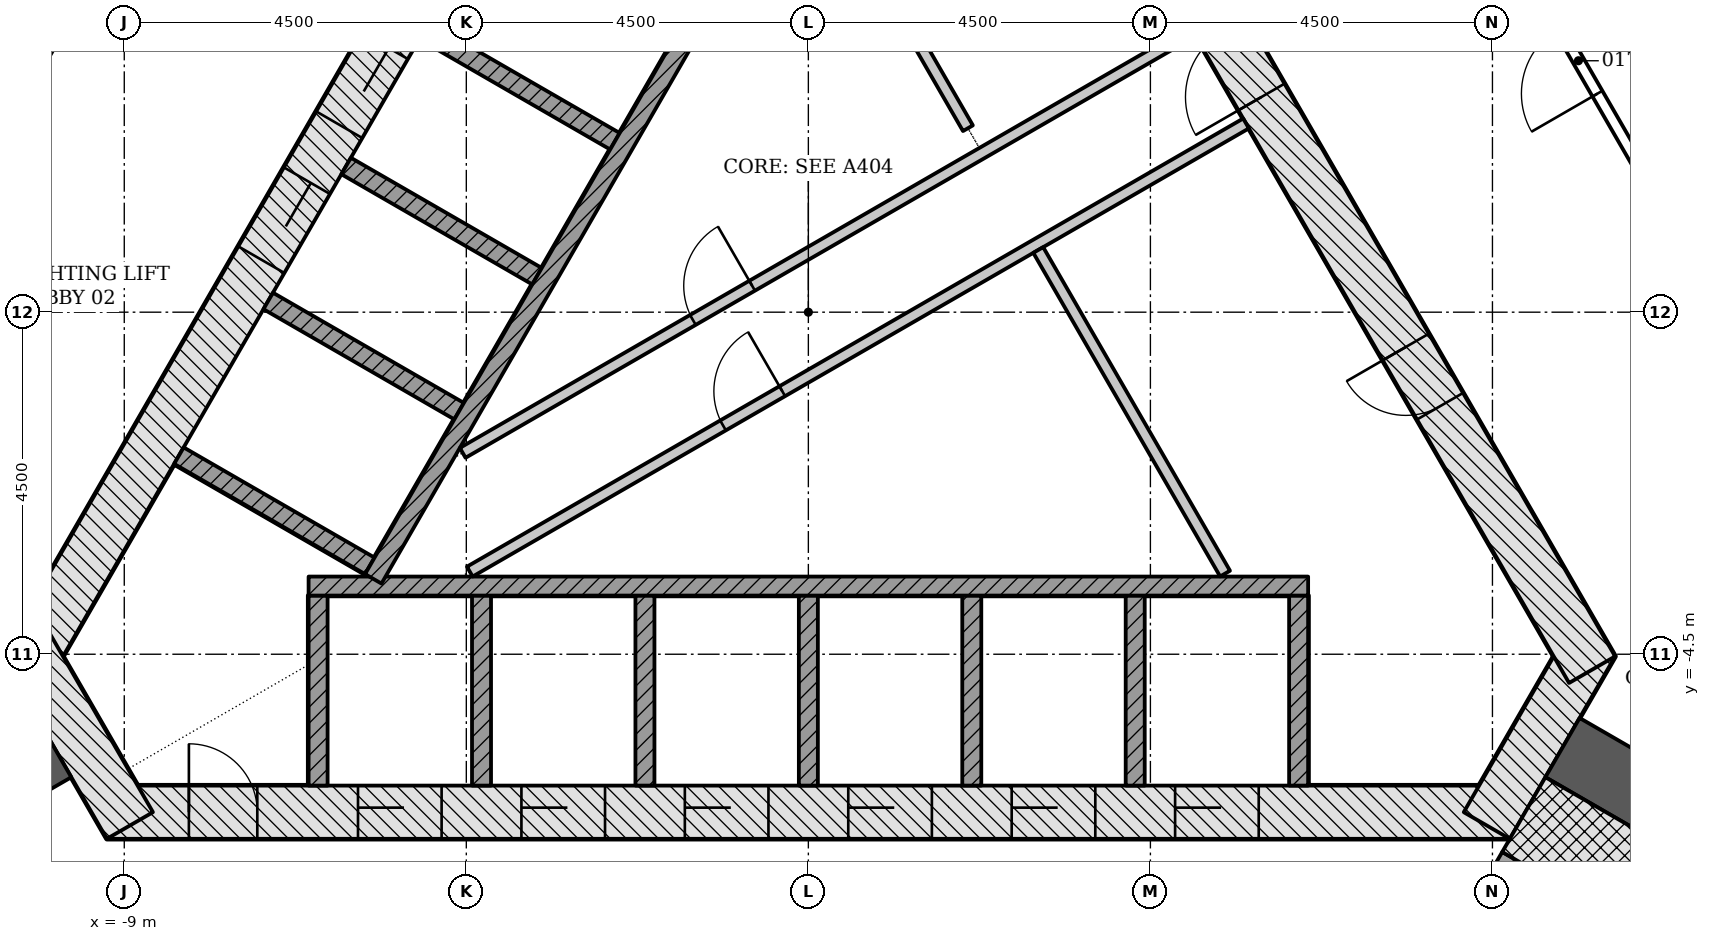
"""IFC4 building model, lengths in metres.
Left out: names, types, materials, properties, quantities, classifications, styles, units other than length and angle.
Written with IfcOpenShell. Run it as: python <this file> out.ifc"""

import sys

from ifc_helpers import new_model, si_unit, direction, frame, frame_2d, origin, place, context, subcontext, project, spatial, rectangle, extrude, element, fill, save


model = new_model("IFC4")
c1 = context("Model", 3, precision=1e-05, world=origin(), true_north=direction((0.0, 1.0)))
c2 = subcontext(c1, "Body", "Model", "MODEL_VIEW")
j1 = project(units=[si_unit("LENGTHUNIT", "METRE"), si_unit("PLANEANGLEUNIT", "RADIAN")], contexts=[c1])
p1 = place(None, origin())
s1 = spatial("IfcSite", under=j1, at=p1, CompositionType="ELEMENT")
p2 = place(p1, origin())
s2 = spatial("IfcBuilding", under=s1, at=p2, CompositionType="ELEMENT")
p3 = place(p2, frame((0.0, 0.0, 10.5)))
s3 = spatial("IfcBuildingStorey", under=s2, at=p3, CompositionType="ELEMENT", Elevation=10.5)
p4 = place(p3, frame((-9.229, -6.578, -0.25), z_axis=(0.0, 0.0, 1.0), x_axis=(1.0, 0.0, 0.0)))
e1 = element("IfcWall", 1, at=p4, inside=s3, PredefinedType="SHEAR", context=c2, shape_type="SweptSolid", body=[
    extrude(rectangle(XDim=18.458, YDim=0.7, at=frame_2d((9.229, 0.0))), origin(), (0.0, 0.0, 1.0), 4.5),
])
p5 = place(p4, frame((3.304, 0.0, 0.25)))
e2 = element("IfcOpeningElement", 2, at=p5, cuts=e1, PredefinedType="OPENING", context=c2, shape_type="SweptSolid", body=[
    extrude(rectangle(XDim=1.1, YDim=2.1, at=frame_2d((0.55, 1.05))), frame((0.0, 0.36, 0.0), z_axis=(0.0, -1.0, 0.0), x_axis=(1.0, 0.0, 0.0)), (0.0, 0.0, 1.0), 0.72),
])
p6 = place(p4, frame((5.454, 0.0, 0.25)))
e3 = element("IfcOpeningElement", 3, at=p6, cuts=e1, PredefinedType="OPENING", context=c2, shape_type="SweptSolid", body=[
    extrude(rectangle(XDim=1.1, YDim=2.1, at=frame_2d((0.55, 1.05))), frame((0.0, 0.36, 0.0), z_axis=(0.0, -1.0, 0.0), x_axis=(1.0, 0.0, 0.0)), (0.0, 0.0, 1.0), 0.72),
])
p7 = place(p4, frame((7.604, 0.0, 0.25)))
e4 = element("IfcOpeningElement", 4, at=p7, cuts=e1, PredefinedType="OPENING", context=c2, shape_type="SweptSolid", body=[
    extrude(rectangle(XDim=1.1, YDim=2.1, at=frame_2d((0.55, 1.05))), frame((0.0, 0.36, 0.0), z_axis=(0.0, -1.0, 0.0), x_axis=(1.0, 0.0, 0.0)), (0.0, 0.0, 1.0), 0.72),
])
p8 = place(p4, frame((9.754, 0.0, 0.25)))
e5 = element("IfcOpeningElement", 5, at=p8, cuts=e1, PredefinedType="OPENING", context=c2, shape_type="SweptSolid", body=[
    extrude(rectangle(XDim=1.1, YDim=2.1, at=frame_2d((0.55, 1.05))), frame((0.0, 0.36, 0.0), z_axis=(0.0, -1.0, 0.0), x_axis=(1.0, 0.0, 0.0)), (0.0, 0.0, 1.0), 0.72),
])
p9 = place(p4, frame((11.904, 0.0, 0.25)))
e6 = element("IfcOpeningElement", 6, at=p9, cuts=e1, PredefinedType="OPENING", context=c2, shape_type="SweptSolid", body=[
    extrude(rectangle(XDim=1.1, YDim=2.1, at=frame_2d((0.55, 1.05))), frame((0.0, 0.36, 0.0), z_axis=(0.0, -1.0, 0.0), x_axis=(1.0, 0.0, 0.0)), (0.0, 0.0, 1.0), 0.72),
])
p10 = place(p4, frame((14.054, 0.0, 0.25)))
e7 = element("IfcOpeningElement", 7, at=p10, cuts=e1, PredefinedType="OPENING", context=c2, shape_type="SweptSolid", body=[
    extrude(rectangle(XDim=1.1, YDim=2.1, at=frame_2d((0.55, 1.05))), frame((0.0, 0.36, 0.0), z_axis=(0.0, -1.0, 0.0), x_axis=(1.0, 0.0, 0.0)), (0.0, 0.0, 1.0), 0.72),
])
p11 = place(p4, frame((1.079, 0.0, 0.25)))
e8 = element("IfcOpeningElement", 8, at=p11, cuts=e1, PredefinedType="OPENING", context=c2, shape_type="SweptSolid", body=[
    extrude(rectangle(XDim=0.9, YDim=2.1, at=frame_2d((0.45, 1.05))), frame((0.0, 0.36, 0.0), z_axis=(0.0, -1.0, 0.0), x_axis=(1.0, 0.0, 0.0)), (0.0, 0.0, 1.0), 0.72),
])
p12 = place(p3, frame((8.926, -6.753, -0.25), z_axis=(0.0, 0.0, 1.0), x_axis=(0.500042739161, 0.866000726912, 0.0)))
e9 = element("IfcWall", 9, at=p12, inside=s3, PredefinedType="SHEAR", context=c2, shape_type="SweptSolid", body=[
    extrude(rectangle(XDim=2.771, YDim=0.7, at=frame_2d((1.386, 0.0))), origin(), (0.0, 0.0, 1.0), 4.5),
])
p13 = place(p3, frame((10.311, -4.703, -0.25), z_axis=(0.0, 0.0, 1.0), x_axis=(-0.500001446645, 0.866024568562, 0.0)))
e10 = element("IfcWall", 10, at=p13, inside=s3, PredefinedType="SHEAR", context=c2, shape_type="SweptSolid", body=[
    extrude(rectangle(XDim=18.458, YDim=0.7, at=frame_2d((9.229, 0.0))), origin(), (0.0, 0.0, 1.0), 4.5),
])
p14 = place(p13, frame((8.7, 0.0, 0.25)))
e11 = element("IfcOpeningElement", 11, at=p14, cuts=e10, PredefinedType="OPENING", context=c2, shape_type="SweptSolid", body=[
    extrude(rectangle(XDim=1.0, YDim=2.1, at=frame_2d((0.5, 1.05))), frame((0.0, 0.36, 0.0), z_axis=(0.0, -1.0, 0.0), x_axis=(1.0, 0.0, 0.0)), (0.0, 0.0, 1.0), 0.72),
])
p15 = place(p13, frame((4.002, 0.0, 0.25)))
e12 = element("IfcOpeningElement", 12, at=p15, cuts=e10, PredefinedType="OPENING", context=c2, shape_type="SweptSolid", body=[
    extrude(rectangle(XDim=0.9, YDim=2.1, at=frame_2d((0.45, 1.05))), frame((0.0, 0.36, 0.0), z_axis=(0.0, -1.0, 0.0), x_axis=(1.0, 0.0, 0.0)), (0.0, 0.0, 1.0), 0.72),
])
p16 = place(p13, frame((14.093, 0.0, 0.25)))
e13 = element("IfcOpeningElement", 13, at=p16, cuts=e10, PredefinedType="OPENING", context=c2, shape_type="SweptSolid", body=[
    extrude(rectangle(XDim=0.9, YDim=2.1, at=frame_2d((0.45, 1.05))), frame((0.0, 0.36, 0.0), z_axis=(0.0, -1.0, 0.0), x_axis=(1.0, 0.0, 0.0)), (0.0, 0.0, 1.0), 0.72),
])
p17 = place(p3, frame((-1.083, 11.281, -0.25), z_axis=(0.0, 0.0, 1.0), x_axis=(-0.500001446645, -0.866024568562, 0.0)))
e14 = element("IfcWall", 14, at=p17, inside=s3, PredefinedType="SHEAR", context=c2, shape_type="SweptSolid", body=[
    extrude(rectangle(XDim=18.458, YDim=0.7, at=frame_2d((9.229, 0.0))), origin(), (0.0, 0.0, 1.0), 4.5),
])
p18 = place(p17, frame((8.979, 0.0, 0.25)))
e15 = element("IfcOpeningElement", 15, at=p18, cuts=e14, PredefinedType="OPENING", context=c2, shape_type="SweptSolid", body=[
    extrude(rectangle(XDim=1.2, YDim=2.1, at=frame_2d((0.6, 1.05))), frame((0.0, 0.36, 0.0), z_axis=(0.0, -1.0, 0.0), x_axis=(1.0, 0.0, 0.0)), (0.0, 0.0, 1.0), 0.72),
])
p19 = place(p17, frame((11.029, 0.0, 0.25)))
e16 = element("IfcOpeningElement", 16, at=p19, cuts=e14, PredefinedType="OPENING", context=c2, shape_type="SweptSolid", body=[
    extrude(rectangle(XDim=1.2, YDim=2.1, at=frame_2d((0.6, 1.05))), frame((0.0, 0.36, 0.0), z_axis=(0.0, -1.0, 0.0), x_axis=(1.0, 0.0, 0.0)), (0.0, 0.0, 1.0), 0.72),
])
p20 = place(p3, frame((-10.311, -4.353, -0.25), z_axis=(0.0, 0.0, 1.0), x_axis=(0.500042739161, -0.866000726912, 0.0)))
e17 = element("IfcWall", 17, at=p20, inside=s3, PredefinedType="SHEAR", context=c2, shape_type="SweptSolid", body=[
    extrude(rectangle(XDim=2.771, YDim=0.7, at=frame_2d((1.386, 0.0))), origin(), (0.0, 0.0, 1.0), 4.5),
])
p21 = place(p3, frame((-9.922, -5.728, -0.25), z_axis=(0.0, 0.0, 1.0), x_axis=(-0.866028046028, -0.499995423472, 0.0)))
e18 = element("IfcWall", 18, at=p21, inside=s3, PredefinedType="SHEAR", context=c2, shape_type="SweptSolid", body=[
    extrude(rectangle(XDim=14.633, YDim=0.9, at=frame_2d((7.316, 0.0))), origin(), (0.0, 0.0, 1.0), 4.5),
])
p22 = place(p21, frame((7.35, 0.0, 0.25)))
e19 = element("IfcOpeningElement", 19, at=p22, cuts=e18, PredefinedType="OPENING", context=c2, shape_type="SweptSolid", body=[
    extrude(rectangle(XDim=1.5, YDim=2.1, at=frame_2d((0.75, 1.05))), frame((0.0, 0.46, 0.0), z_axis=(0.0, -1.0, 0.0), x_axis=(1.0, 0.0, 0.0)), (0.0, 0.0, 1.0), 0.92),
])
p23 = place(p3, frame((9.922, -5.728, -0.25), z_axis=(0.0, 0.0, 1.0), x_axis=(0.866028046028, -0.499995423472, 0.0)))
e20 = element("IfcWall", 20, at=p23, inside=s3, PredefinedType="SHEAR", context=c2, shape_type="SweptSolid", body=[
    extrude(rectangle(XDim=14.633, YDim=0.9, at=frame_2d((7.316, 0.0))), origin(), (0.0, 0.0, 1.0), 4.5),
])
p24 = place(p23, frame((7.35, 0.0, 0.25)))
e21 = element("IfcOpeningElement", 21, at=p24, cuts=e20, PredefinedType="OPENING", context=c2, shape_type="SweptSolid", body=[
    extrude(rectangle(XDim=1.5, YDim=2.1, at=frame_2d((0.75, 1.05))), frame((0.0, 0.46, 0.0), z_axis=(0.0, -1.0, 0.0), x_axis=(1.0, 0.0, 0.0)), (0.0, 0.0, 1.0), 0.92),
])
for number, where, z_axis, x_axis in (
    (22, (-6.45, -6.228, -0.25), (0.0, 0.0, 1.0), (0.0, 1.0, 0.0)),
    (23, (-4.3, -6.228, -0.25), (0.0, 0.0, 1.0), (0.0, 1.0, 0.0)),
    (24, (-2.15, -6.228, -0.25), (0.0, 0.0, 1.0), (0.0, 1.0, 0.0)),
    (25, (0.0, -6.228, -0.25), (0.0, 0.0, 1.0), (0.0, 1.0, 0.0)),
    (26, (2.15, -6.228, -0.25), (0.0, 0.0, 1.0), (0.0, 1.0, 0.0)),
    (27, (4.3, -6.228, -0.25), (0.0, 0.0, 1.0), (0.0, 1.0, 0.0)),
    (28, (6.45, -6.228, -0.25), (0.0, 0.0, 1.0), (0.0, 1.0, 0.0)),
):
    element("IfcWall", number, at=place(p3, frame(where, z_axis=z_axis, x_axis=x_axis)), inside=s3, PredefinedType="PARTITIONING", context=c2, shape_type="SweptSolid", body=[
        extrude(rectangle(XDim=2.5, YDim=0.25, at=frame_2d((1.25, 0.0))), origin(), (0.0, 0.0, 1.0), 4.5),
    ])
p25 = place(p3, frame((-6.575, -3.603, 0.0), z_axis=(0.0, 0.0, 1.0), x_axis=(1.0, 0.0, 0.0)))
e29 = element("IfcWall", 29, at=p25, inside=s3, PredefinedType="PARTITIONING", context=c2, shape_type="SweptSolid", body=[
    extrude(rectangle(XDim=13.15, YDim=0.25, at=frame_2d((6.575, 0.0))), origin(), (0.0, 0.0, 1.0), 4.25),
])
for number, where, z_axis, x_axis in (
    (30, (-5.056, 3.699, -0.25), (0.0, 0.0, 1.0), (0.866, -0.5, 0.0)),
    (31, (-6.081, 1.923, -0.25), (0.0, 0.0, 1.0), (0.866, -0.5, 0.0)),
    (32, (-7.106, 0.148, -0.25), (0.0, 0.0, 1.0), (0.866, -0.5, 0.0)),
    (33, (-8.281, -1.887, -0.25), (0.0, 0.0, 1.0), (0.866, -0.5, 0.0)),
):
    element("IfcWall", number, at=place(p3, frame(where, z_axis=z_axis, x_axis=x_axis)), inside=s3, PredefinedType="PARTITIONING", context=c2, shape_type="SweptSolid", body=[
        extrude(rectangle(XDim=2.9, YDim=0.25, at=frame_2d((1.45, 0.0))), origin(), (0.0, 0.0, 1.0), 4.5),
    ])
p26 = place(p3, frame((0.176, 6.711, 0.0), z_axis=(0.0, 0.0, 1.0), x_axis=(-0.500004227369, -0.866022963098, 0.0)))
e34 = element("IfcWall", 34, at=p26, inside=s3, PredefinedType="PARTITIONING", context=c2, shape_type="SweptSolid", body=[
    extrude(rectangle(XDim=11.8, YDim=0.25, at=frame_2d((5.9, 0.0))), origin(), (0.0, 0.0, 1.0), 4.25),
])
p27 = place(p3, frame((-4.548, -1.851, 0.0), z_axis=(0.0, 0.0, 1.0), x_axis=(0.866023939251, 0.500002536638, 0.0)))
e35 = element("IfcWall", 35, at=p27, inside=s3, PredefinedType="PARTITIONING", context=c2, shape_type="SweptSolid", body=[
    extrude(rectangle(XDim=11.092, YDim=0.15, at=frame_2d((5.546, 0.0))), origin(), (0.0, 0.0, 1.0), 4.25),
])
p28 = place(p27, frame((3.497, 0.0, 0.0)))
e36 = element("IfcOpeningElement", 36, at=p28, cuts=e35, PredefinedType="OPENING", context=c2, shape_type="SweptSolid", body=[
    extrude(rectangle(XDim=0.9, YDim=2.1, at=frame_2d((0.45, 1.05))), frame((0.0, 0.085, 0.0), z_axis=(0.0, -1.0, 0.0), x_axis=(1.0, 0.0, 0.0)), (0.0, 0.0, 1.0), 0.17),
])
p29 = place(p3, frame((2.099, 2.42, 0.0), z_axis=(0.0, 0.0, 1.0), x_axis=(-0.499998449073, 0.866026299211, 0.0)))
e37 = element("IfcWall", 37, at=p29, inside=s3, PredefinedType="PARTITIONING", context=c2, shape_type="SweptSolid", body=[
    extrude(rectangle(XDim=4.211, YDim=0.15, at=frame_2d((2.106, 0.0))), origin(), (0.0, 0.0, 1.0), 4.25),
])
p30 = place(p3, frame((-4.454, -3.413, 0.0), z_axis=(0.0, 0.0, 1.0), x_axis=(0.86603043987, 0.499991277142, 0.0)))
e38 = element("IfcWall", 38, at=p30, inside=s3, PredefinedType="PARTITIONING", context=c2, shape_type="SweptSolid", body=[
    extrude(rectangle(XDim=11.792, YDim=0.15, at=frame_2d((5.896, 0.0))), origin(), (0.0, 0.0, 1.0), 4.25),
])
p31 = place(p30, frame((3.847, 0.0, 0.0)))
e39 = element("IfcOpeningElement", 39, at=p31, cuts=e38, PredefinedType="OPENING", context=c2, shape_type="SweptSolid", body=[
    extrude(rectangle(XDim=0.9, YDim=2.1, at=frame_2d((0.45, 1.05))), frame((0.0, 0.085, 0.0), z_axis=(0.0, -1.0, 0.0), x_axis=(1.0, 0.0, 0.0)), (0.0, 0.0, 1.0), 0.17),
])
p32 = place(p3, frame((5.482, -3.439, 0.0), z_axis=(0.0, 0.0, 1.0), x_axis=(-0.500006183238, 0.866021833861, 0.0)))
e40 = element("IfcWall", 40, at=p32, inside=s3, PredefinedType="PARTITIONING", context=c2, shape_type="SweptSolid", body=[
    extrude(rectangle(XDim=4.916, YDim=0.15, at=frame_2d((2.458, 0.0))), origin(), (0.0, 0.0, 1.0), 4.25),
])
p33 = place(p3, frame((7.44, -10.226, -0.25), z_axis=(0.0, 0.0, 1.0), x_axis=(0.500022077904, 0.866012656725, 0.0)))
e41 = element("IfcWall", 41, at=p33, inside=s3, PredefinedType="SHEAR", context=c2, shape_type="SweptSolid", body=[
    extrude(rectangle(XDim=3.55, YDim=0.2, at=frame_2d((1.775, 0.0))), origin(), (0.0, 0.0, 1.0), 4.5),
])
p34 = place(p33, frame((1.175, 0.0, 0.25)))
e42 = element("IfcOpeningElement", 42, at=p34, cuts=e41, PredefinedType="OPENING", context=c2, shape_type="SweptSolid", body=[
    extrude(rectangle(XDim=1.2, YDim=2.1, at=frame_2d((0.6, 1.05))), frame((0.0, 0.11, 0.0), z_axis=(0.0, -1.0, 0.0), x_axis=(1.0, 0.0, 0.0)), (0.0, 0.0, 1.0), 0.22),
])
p35 = place(p3, frame((9.413, -6.61, -0.25), z_axis=(0.0, 0.0, 1.0), x_axis=(0.866018442252, -0.500012057535, 0.0)))
e43 = element("IfcWall", 43, at=p35, inside=s3, PredefinedType="SHEAR", context=c2, shape_type="SweptSolid", body=[
    extrude(rectangle(XDim=7.2, YDim=1.136, at=frame_2d((3.6, 0.0))), origin(), (0.0, 0.0, 1.0), 4.5),
])
p36 = place(p3, frame((-9.031, 5.213, 0.0), z_axis=(0.0, 0.0, 1.0), x_axis=(-0.500044734646, -0.865999574684, 0.0)))
e44 = element("IfcWall", 44, at=p36, inside=s3, PredefinedType="PARTITIONING", context=c2, shape_type="SweptSolid", body=[
    extrude(rectangle(XDim=4.35, YDim=0.2, at=frame_2d((2.175, 0.0))), origin(), (0.0, 0.0, 1.0), 3.638),
])
p37 = place(p3, frame((11.206, 1.446, 0.0), z_axis=(0.0, 0.0, 1.0), x_axis=(-0.500044734646, 0.865999574684, 0.0)))
e45 = element("IfcWall", 45, at=p37, inside=s3, PredefinedType="PARTITIONING", context=c2, shape_type="SweptSolid", body=[
    extrude(rectangle(XDim=4.35, YDim=0.15, at=frame_2d((2.175, 0.0))), origin(), (0.0, 0.0, 1.0), 3.638),
])
p38 = place(p37, frame((1.65, 0.0, 0.0)))
e46 = element("IfcOpeningElement", 46, at=p38, cuts=e45, PredefinedType="OPENING", context=c2, shape_type="SweptSolid", body=[
    extrude(rectangle(XDim=1.0, YDim=2.1, at=frame_2d((0.5, 1.05))), frame((0.0, 0.085, 0.0), z_axis=(0.0, -1.0, 0.0), x_axis=(1.0, 0.0, 0.0)), (0.0, 0.0, 1.0), 0.17),
])
p39 = place(p5, origin())
e47 = element("IfcDoor", 47, at=p39, inside=s3, OperationType="DOUBLE_DOOR_SLIDING", PredefinedType="DOOR", context=c2, shape_type="SweptSolid", body=[
    extrude(rectangle(XDim=1.1, YDim=2.1, at=frame_2d((0.55, 1.05))), frame((0.0, 0.025, 0.0), z_axis=(0.0, -1.0, 0.0), x_axis=(1.0, 0.0, 0.0)), (0.0, 0.0, 1.0), 0.05),
])
fill(e2, e47)
p40 = place(p6, origin())
e48 = element("IfcDoor", 48, at=p40, inside=s3, OperationType="DOUBLE_DOOR_SLIDING", PredefinedType="DOOR", context=c2, shape_type="SweptSolid", body=[
    extrude(rectangle(XDim=1.1, YDim=2.1, at=frame_2d((0.55, 1.05))), frame((0.0, 0.025, 0.0), z_axis=(0.0, -1.0, 0.0), x_axis=(1.0, 0.0, 0.0)), (0.0, 0.0, 1.0), 0.05),
])
fill(e3, e48)
p41 = place(p7, origin())
e49 = element("IfcDoor", 49, at=p41, inside=s3, OperationType="DOUBLE_DOOR_SLIDING", PredefinedType="DOOR", context=c2, shape_type="SweptSolid", body=[
    extrude(rectangle(XDim=1.1, YDim=2.1, at=frame_2d((0.55, 1.05))), frame((0.0, 0.025, 0.0), z_axis=(0.0, -1.0, 0.0), x_axis=(1.0, 0.0, 0.0)), (0.0, 0.0, 1.0), 0.05),
])
fill(e4, e49)
p42 = place(p8, origin())
e50 = element("IfcDoor", 50, at=p42, inside=s3, OperationType="DOUBLE_DOOR_SLIDING", PredefinedType="DOOR", context=c2, shape_type="SweptSolid", body=[
    extrude(rectangle(XDim=1.1, YDim=2.1, at=frame_2d((0.55, 1.05))), frame((0.0, 0.025, 0.0), z_axis=(0.0, -1.0, 0.0), x_axis=(1.0, 0.0, 0.0)), (0.0, 0.0, 1.0), 0.05),
])
fill(e5, e50)
p43 = place(p9, origin())
e51 = element("IfcDoor", 51, at=p43, inside=s3, OperationType="DOUBLE_DOOR_SLIDING", PredefinedType="DOOR", context=c2, shape_type="SweptSolid", body=[
    extrude(rectangle(XDim=1.1, YDim=2.1, at=frame_2d((0.55, 1.05))), frame((0.0, 0.025, 0.0), z_axis=(0.0, -1.0, 0.0), x_axis=(1.0, 0.0, 0.0)), (0.0, 0.0, 1.0), 0.05),
])
fill(e6, e51)
p44 = place(p10, origin())
e52 = element("IfcDoor", 52, at=p44, inside=s3, OperationType="DOUBLE_DOOR_SLIDING", PredefinedType="DOOR", context=c2, shape_type="SweptSolid", body=[
    extrude(rectangle(XDim=1.1, YDim=2.1, at=frame_2d((0.55, 1.05))), frame((0.0, 0.025, 0.0), z_axis=(0.0, -1.0, 0.0), x_axis=(1.0, 0.0, 0.0)), (0.0, 0.0, 1.0), 0.05),
])
fill(e7, e52)
p45 = place(p18, origin())
e53 = element("IfcDoor", 53, at=p45, inside=s3, OperationType="DOUBLE_DOOR_SLIDING", PredefinedType="DOOR", context=c2, shape_type="SweptSolid", body=[
    extrude(rectangle(XDim=1.2, YDim=2.1, at=frame_2d((0.6, 1.05))), frame((0.0, 0.025, 0.0), z_axis=(0.0, -1.0, 0.0), x_axis=(1.0, 0.0, 0.0)), (0.0, 0.0, 1.0), 0.05),
])
fill(e15, e53)
p46 = place(p19, origin())
e54 = element("IfcDoor", 54, at=p46, inside=s3, OperationType="DOUBLE_DOOR_SLIDING", PredefinedType="DOOR", context=c2, shape_type="SweptSolid", body=[
    extrude(rectangle(XDim=1.2, YDim=2.1, at=frame_2d((0.6, 1.05))), frame((0.0, 0.025, 0.0), z_axis=(0.0, -1.0, 0.0), x_axis=(1.0, 0.0, 0.0)), (0.0, 0.0, 1.0), 0.05),
])
fill(e16, e54)
p47 = place(p14, origin())
e55 = element("IfcDoor", 55, at=p47, inside=s3, OperationType="SINGLE_SWING_LEFT", PredefinedType="DOOR", context=c2, shape_type="SweptSolid", body=[
    extrude(rectangle(XDim=1.0, YDim=2.1, at=frame_2d((0.5, 1.05))), frame((0.0, 0.075, 0.0), z_axis=(0.0, -1.0, 0.0), x_axis=(1.0, 0.0, 0.0)), (0.0, 0.0, 1.0), 0.15),
])
fill(e11, e55)
p48 = place(p15, origin())
e56 = element("IfcDoor", 56, at=p48, inside=s3, OperationType="SINGLE_SWING_RIGHT", PredefinedType="DOOR", context=c2, shape_type="SweptSolid", body=[
    extrude(rectangle(XDim=0.9, YDim=2.1, at=frame_2d((0.45, 1.05))), frame((0.0, 0.075, 0.0), z_axis=(0.0, -1.0, 0.0), x_axis=(1.0, 0.0, 0.0)), (0.0, 0.0, 1.0), 0.15),
])
fill(e12, e56)
p49 = place(p31, origin())
e57 = element("IfcDoor", 57, at=p49, inside=s3, OperationType="SINGLE_SWING_RIGHT", PredefinedType="DOOR", context=c2, shape_type="SweptSolid", body=[
    extrude(rectangle(XDim=0.9, YDim=2.1, at=frame_2d((0.45, 1.05))), frame((0.0, 0.025, 0.0), z_axis=(0.0, -1.0, 0.0), x_axis=(1.0, 0.0, 0.0)), (0.0, 0.0, 1.0), 0.05),
])
fill(e39, e57)
p50 = place(p11, origin())
e58 = element("IfcDoor", 58, at=p50, inside=s3, OperationType="SINGLE_SWING_LEFT", PredefinedType="DOOR", context=c2, shape_type="SweptSolid", body=[
    extrude(rectangle(XDim=0.9, YDim=2.1, at=frame_2d((0.45, 1.05))), frame((0.0, 0.075, 0.0), z_axis=(0.0, -1.0, 0.0), x_axis=(1.0, 0.0, 0.0)), (0.0, 0.0, 1.0), 0.15),
])
fill(e8, e58)
p51 = place(p28, origin())
e59 = element("IfcDoor", 59, at=p51, inside=s3, OperationType="SINGLE_SWING_RIGHT", PredefinedType="DOOR", context=c2, shape_type="SweptSolid", body=[
    extrude(rectangle(XDim=0.9, YDim=2.1, at=frame_2d((0.45, 1.05))), frame((0.0, 0.025, 0.0), z_axis=(0.0, -1.0, 0.0), x_axis=(1.0, 0.0, 0.0)), (0.0, 0.0, 1.0), 0.05),
])
fill(e36, e59)
p52 = place(p38, origin())
e60 = element("IfcDoor", 60, at=p52, inside=s3, OperationType="SINGLE_SWING_RIGHT", PredefinedType="DOOR", context=c2, shape_type="SweptSolid", body=[
    extrude(rectangle(XDim=1.0, YDim=2.1, at=frame_2d((0.5, 1.05))), frame((0.0, 0.025, 0.0), z_axis=(0.0, -1.0, 0.0), x_axis=(1.0, 0.0, 0.0)), (0.0, 0.0, 1.0), 0.05),
])
fill(e46, e60)
save(model, sys.argv[1])
